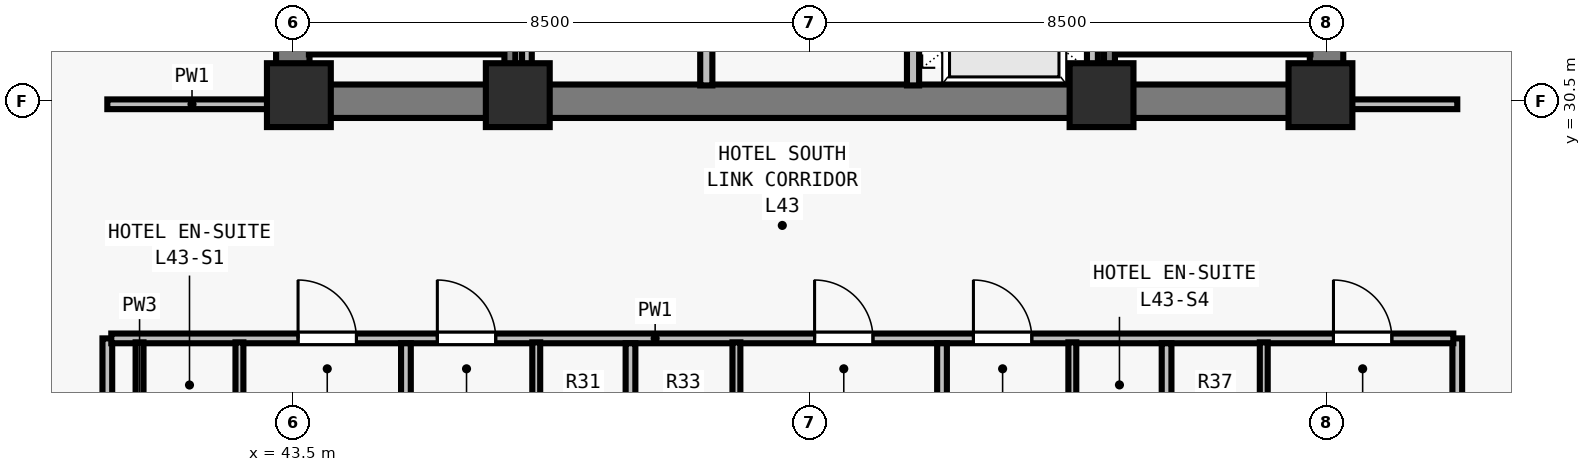
"""IFC4 building model, lengths in metres.
Left out: names, types, materials, properties, quantities, classifications, styles, units other than length and angle.
Written with IfcOpenShell. Run it as: python <this file> out.ifc"""

import sys

from ifc_helpers import new_model, si_unit, direction, frame, frame_2d, origin, origin_2d, place, context, subcontext, project, spatial, rectangle, extrude, element, fill, save


model = new_model("IFC4")
c1 = context("Model", 3, precision=1e-05, world=origin(), true_north=direction((0.0, 1.0)))
c2 = subcontext(c1, "Body", "Model", "MODEL_VIEW")
j1 = project(units=[si_unit("LENGTHUNIT", "METRE"), si_unit("PLANEANGLEUNIT", "RADIAN")], contexts=[c1])
p1 = place(None, origin())
s1 = spatial("IfcSite", under=j1, at=p1, CompositionType="ELEMENT")
p2 = place(p1, origin())
s2 = spatial("IfcBuilding", under=s1, at=p2, CompositionType="ELEMENT")
p3 = place(p2, frame((0.0, 0.0, 158.5)))
s3 = spatial("IfcBuildingStorey", under=s2, at=p3, CompositionType="ELEMENT", Elevation=158.5)
for number, where, z_axis, x_axis in (
    (1, (43.6, 30.6, 0.0), (0.0, 0.0, 1.0), (1.0, 0.0, 0.0)),
    (2, (47.2, 30.6, 0.0), (0.0, 0.0, 1.0), (1.0, 0.0, 0.0)),
    (3, (56.8, 30.6, 0.0), (0.0, 0.0, 1.0), (1.0, 0.0, 0.0)),
    (4, (60.4, 30.6, 0.0), (0.0, 0.0, 1.0), (1.0, 0.0, 0.0)),
):
    element("IfcColumn", number, at=place(p3, frame(where, z_axis=z_axis, x_axis=x_axis)), inside=s3, PredefinedType="COLUMN", context=c2, shape_type="SweptSolid", body=[
        extrude(rectangle(XDim=1.05, YDim=1.05, at=origin_2d()), origin(), (0.0, 0.0, 1.0), 3.5),
    ])
p4 = place(p3, frame((43.225, 30.5, 0.0), z_axis=(0.0, 0.0, 1.0), x_axis=(1.0, 0.0, 0.0)))
e5 = element("IfcWall", 5, at=p4, inside=s3, PredefinedType="SHEAR", context=c2, shape_type="SweptSolid", body=[
    extrude(rectangle(XDim=17.55, YDim=0.55, at=frame_2d((8.775, 0.0))), origin(), (0.0, 0.0, 1.0), 3.28),
])
for number, where, z_axis, x_axis in (
    (6, (43.5, 30.765, 0.0), (0.0, 0.0, 1.0), (0.0, 1.0, 0.0)),
    (7, (60.5, 30.765, 0.0), (0.0, 0.0, 1.0), (0.0, 1.0, 0.0)),
):
    element("IfcWall", number, at=place(p3, frame(where, z_axis=z_axis, x_axis=x_axis)), inside=s3, PredefinedType="SHEAR", context=c2, shape_type="SweptSolid", body=[
        extrude(rectangle(XDim=7.985, YDim=0.55, at=frame_2d((3.993, 0.0))), origin(), (0.0, 0.0, 1.0), 3.28),
    ])
p5 = place(p3, frame((50.3, 30.76, 0.0), z_axis=(0.0, 0.0, 1.0), x_axis=(0.0, 1.0, 0.0)))
e8 = element("IfcWall", 8, at=p5, inside=s3, PredefinedType="SOLIDWALL", context=c2, shape_type="SweptSolid", body=[
    extrude(rectangle(XDim=7.855, YDim=0.2, at=frame_2d((3.927, 0.0))), origin(), (0.0, 0.0, 1.0), 3.28),
])
p6 = place(p5, frame((3.29, 0.0, 0.0)))
e9 = element("IfcOpeningElement", 9, at=p6, cuts=e8, PredefinedType="OPENING", context=c2, shape_type="SweptSolid", body=[
    extrude(rectangle(XDim=0.9, YDim=2.12, at=frame_2d((0.45, 1.06))), frame((0.0, 0.11, 0.0), z_axis=(0.0, -1.0, 0.0), x_axis=(1.0, 0.0, 0.0)), (0.0, 0.0, 1.0), 0.22),
])
p7 = place(p3, frame((53.7, 30.76, 0.0), z_axis=(0.0, 0.0, 1.0), x_axis=(0.0, 1.0, 0.0)))
e10 = element("IfcWall", 10, at=p7, inside=s3, PredefinedType="SOLIDWALL", context=c2, shape_type="SweptSolid", body=[
    extrude(rectangle(XDim=7.855, YDim=0.2, at=frame_2d((3.927, 0.0))), origin(), (0.0, 0.0, 1.0), 3.28),
])
p8 = place(p7, frame((0.79, 0.0, 0.0)))
e11 = element("IfcOpeningElement", 11, at=p8, cuts=e10, PredefinedType="OPENING", context=c2, shape_type="SweptSolid", body=[
    extrude(rectangle(XDim=1.1, YDim=2.2, at=frame_2d((0.55, 1.1))), frame((0.0, 0.11, 0.0), z_axis=(0.0, -1.0, 0.0), x_axis=(1.0, 0.0, 0.0)), (0.0, 0.0, 1.0), 0.22),
])
p9 = place(p7, frame((3.49, 0.0, 0.0)))
e12 = element("IfcOpeningElement", 12, at=p9, cuts=e10, PredefinedType="OPENING", context=c2, shape_type="SweptSolid", body=[
    extrude(rectangle(XDim=1.1, YDim=2.2, at=frame_2d((0.55, 1.1))), frame((0.0, 0.11, 0.0), z_axis=(0.0, -1.0, 0.0), x_axis=(1.0, 0.0, 0.0)), (0.0, 0.0, 1.0), 0.22),
])
p10 = place(p7, frame((6.19, 0.0, 0.0)))
e13 = element("IfcOpeningElement", 13, at=p10, cuts=e10, PredefinedType="OPENING", context=c2, shape_type="SweptSolid", body=[
    extrude(rectangle(XDim=1.1, YDim=2.2, at=frame_2d((0.55, 1.1))), frame((0.0, 0.11, 0.0), z_axis=(0.0, -1.0, 0.0), x_axis=(1.0, 0.0, 0.0)), (0.0, 0.0, 1.0), 0.22),
])
p11 = place(p3, frame((47.35, 30.76, 0.0), z_axis=(0.0, 0.0, 1.0), x_axis=(0.0, 1.0, 0.0)))
e14 = element("IfcWall", 14, at=p11, inside=s3, PredefinedType="PARTITIONING", context=c2, shape_type="SweptSolid", body=[
    extrude(rectangle(XDim=7.855, YDim=0.16, at=frame_2d((3.927, 0.0))), origin(), (0.0, 0.0, 1.0), 3.28),
])
p12 = place(p3, frame((56.65, 30.76, 0.0), z_axis=(0.0, 0.0, 1.0), x_axis=(0.0, 1.0, 0.0)))
e15 = element("IfcWall", 15, at=p12, inside=s3, PredefinedType="SOLIDWALL", context=c2, shape_type="SweptSolid", body=[
    extrude(rectangle(XDim=7.855, YDim=0.18, at=frame_2d((3.927, 0.0))), origin(), (0.0, 0.0, 1.0), 3.28),
])
p13 = place(p3, frame((40.45, 15.325, 0.0), z_axis=(0.0, 0.0, 1.0), x_axis=(0.0, 1.0, 0.0)))
e16 = element("IfcWall", 16, at=p13, inside=s3, PredefinedType="PARTITIONING", context=c2, shape_type="SweptSolid", body=[
    extrude(rectangle(XDim=11.275, YDim=0.16, at=frame_2d((5.638, 0.0))), origin(), (0.0, 0.0, 1.0), 2.555),
])
p14 = place(p3, frame((40.45, 30.45, 0.0), z_axis=(0.0, 0.0, 1.0), x_axis=(1.0, 0.0, 0.0)))
e17 = element("IfcWall", 17, at=p14, inside=s3, PredefinedType="PARTITIONING", context=c2, shape_type="SweptSolid", body=[
    extrude(rectangle(XDim=2.785, YDim=0.16, at=frame_2d((1.393, 0.0))), origin(), (0.0, 0.0, 1.0), 3.28),
])
p15 = place(p3, frame((62.65, 15.325, 0.0), z_axis=(0.0, 0.0, 1.0), x_axis=(0.0, 1.0, 0.0)))
e18 = element("IfcWall", 18, at=p15, inside=s3, PredefinedType="PARTITIONING", context=c2, shape_type="SweptSolid", body=[
    extrude(rectangle(XDim=11.275, YDim=0.16, at=frame_2d((5.638, 0.0))), origin(), (0.0, 0.0, 1.0), 3.28),
])
p16 = place(p3, frame((60.765, 30.45, 0.0), z_axis=(0.0, 0.0, 1.0), x_axis=(1.0, 0.0, 0.0)))
e19 = element("IfcWall", 19, at=p16, inside=s3, PredefinedType="PARTITIONING", context=c2, shape_type="SweptSolid", body=[
    extrude(rectangle(XDim=1.885, YDim=0.16, at=frame_2d((0.942, 0.0))), origin(), (0.0, 0.0, 1.0), 3.28),
])
p17 = place(p3, frame((40.515, 26.6, 0.0), z_axis=(0.0, 0.0, 1.0), x_axis=(1.0, 0.0, 0.0)))
e20 = element("IfcWall", 20, at=p17, inside=s3, PredefinedType="PARTITIONING", context=c2, shape_type="SweptSolid", body=[
    extrude(rectangle(XDim=22.07, YDim=0.16, at=frame_2d((11.035, 0.0))), origin(), (0.0, 0.0, 1.0), 3.28),
])
p18 = place(p17, frame((3.072, 0.0, 0.0)))
e21 = element("IfcOpeningElement", 21, at=p18, cuts=e20, PredefinedType="OPENING", context=c2, shape_type="SweptSolid", body=[
    extrude(rectangle(XDim=0.96, YDim=2.15, at=frame_2d((0.48, 1.075))), frame((0.0, 0.09, 0.0), z_axis=(0.0, -1.0, 0.0), x_axis=(1.0, 0.0, 0.0)), (0.0, 0.0, 1.0), 0.18),
])
p19 = place(p17, frame((5.362, 0.0, 0.0)))
e22 = element("IfcOpeningElement", 22, at=p19, cuts=e20, PredefinedType="OPENING", context=c2, shape_type="SweptSolid", body=[
    extrude(rectangle(XDim=0.96, YDim=2.15, at=frame_2d((0.48, 1.075))), frame((0.0, 0.09, 0.0), z_axis=(0.0, -1.0, 0.0), x_axis=(1.0, 0.0, 0.0)), (0.0, 0.0, 1.0), 0.18),
])
p20 = place(p17, frame((11.566, 0.0, 0.0)))
e23 = element("IfcOpeningElement", 23, at=p20, cuts=e20, PredefinedType="OPENING", context=c2, shape_type="SweptSolid", body=[
    extrude(rectangle(XDim=0.96, YDim=2.15, at=frame_2d((0.48, 1.075))), frame((0.0, 0.09, 0.0), z_axis=(0.0, -1.0, 0.0), x_axis=(1.0, 0.0, 0.0)), (0.0, 0.0, 1.0), 0.18),
])
p21 = place(p17, frame((14.178, 0.0, 0.0)))
e24 = element("IfcOpeningElement", 24, at=p21, cuts=e20, PredefinedType="OPENING", context=c2, shape_type="SweptSolid", body=[
    extrude(rectangle(XDim=0.96, YDim=2.15, at=frame_2d((0.48, 1.075))), frame((0.0, 0.09, 0.0), z_axis=(0.0, -1.0, 0.0), x_axis=(1.0, 0.0, 0.0)), (0.0, 0.0, 1.0), 0.18),
])
p22 = place(p17, frame((20.099, 0.0, 0.0)))
e25 = element("IfcOpeningElement", 25, at=p22, cuts=e20, PredefinedType="OPENING", context=c2, shape_type="SweptSolid", body=[
    extrude(rectangle(XDim=0.96, YDim=2.15, at=frame_2d((0.48, 1.075))), frame((0.0, 0.09, 0.0), z_axis=(0.0, -1.0, 0.0), x_axis=(1.0, 0.0, 0.0)), (0.0, 0.0, 1.0), 0.18),
])
for number, where, z_axis, x_axis in (
    (26, (40.98, 24.22, 0.0), (0.0, 0.0, 1.0), (0.0, 1.0, 0.0)),
    (27, (42.622, 24.22, 0.0), (0.0, 0.0, 1.0), (0.0, 1.0, 0.0)),
):
    element("IfcWall", number, at=place(p3, frame(where, z_axis=z_axis, x_axis=x_axis)), inside=s3, PredefinedType="PLUMBINGWALL", context=c2, shape_type="SweptSolid", body=[
        extrude(rectangle(XDim=2.315, YDim=0.13, at=frame_2d((1.157, 0.0))), origin(), (0.0, 0.0, 1.0), 3.28),
    ])
p23 = place(p3, frame((45.361, 15.325, 0.0), z_axis=(0.0, 0.0, 1.0), x_axis=(0.0, 1.0, 0.0)))
e28 = element("IfcWall", 28, at=p23, inside=s3, PredefinedType="PARTITIONING", context=c2, shape_type="SweptSolid", body=[
    extrude(rectangle(XDim=11.195, YDim=0.16, at=frame_2d((5.598, 0.0))), origin(), (0.0, 0.0, 1.0), 3.28),
])
p24 = place(p3, frame((47.503, 24.22, 0.0), z_axis=(0.0, 0.0, 1.0), x_axis=(0.0, 1.0, 0.0)))
e29 = element("IfcWall", 29, at=p24, inside=s3, PredefinedType="PLUMBINGWALL", context=c2, shape_type="SweptSolid", body=[
    extrude(rectangle(XDim=2.315, YDim=0.13, at=frame_2d((1.157, 0.0))), origin(), (0.0, 0.0, 1.0), 3.28),
])
p25 = place(p3, frame((49.053, 17.262, 0.0), z_axis=(0.0, 0.0, 1.0), x_axis=(0.0, 1.0, 0.0)))
e30 = element("IfcWall", 30, at=p25, inside=s3, PredefinedType="PARTITIONING", context=c2, shape_type="SweptSolid", body=[
    extrude(rectangle(XDim=9.258, YDim=0.16, at=frame_2d((4.629, 0.0))), origin(), (0.0, 0.0, 1.0), 2.896),
])
p26 = place(p3, frame((50.795, 24.22, 0.0), z_axis=(0.0, 0.0, 1.0), x_axis=(0.0, 1.0, 0.0)))
e31 = element("IfcWall", 31, at=p26, inside=s3, PredefinedType="PLUMBINGWALL", context=c2, shape_type="SweptSolid", body=[
    extrude(rectangle(XDim=2.315, YDim=0.13, at=frame_2d((1.157, 0.0))), origin(), (0.0, 0.0, 1.0), 3.28),
])
p27 = place(p3, frame((54.177, 15.27, 0.0), z_axis=(0.0, 0.0, 1.0), x_axis=(0.0, 1.0, 0.0)))
e32 = element("IfcWall", 32, at=p27, inside=s3, PredefinedType="PARTITIONING", context=c2, shape_type="SweptSolid", body=[
    extrude(rectangle(XDim=11.25, YDim=0.16, at=frame_2d((5.625, 0.0))), origin(), (0.0, 0.0, 1.0), 2.896),
])
p28 = place(p3, frame((56.32, 24.22, 0.0), z_axis=(0.0, 0.0, 1.0), x_axis=(0.0, 1.0, 0.0)))
e33 = element("IfcWall", 33, at=p28, inside=s3, PredefinedType="PLUMBINGWALL", context=c2, shape_type="SweptSolid", body=[
    extrude(rectangle(XDim=2.315, YDim=0.13, at=frame_2d((1.157, 0.0))), origin(), (0.0, 0.0, 1.0), 3.28),
])
p29 = place(p3, frame((57.869, 15.325, 0.0), z_axis=(0.0, 0.0, 1.0), x_axis=(0.0, 1.0, 0.0)))
e34 = element("IfcWall", 34, at=p29, inside=s3, PredefinedType="PARTITIONING", context=c2, shape_type="SweptSolid", body=[
    extrude(rectangle(XDim=11.195, YDim=0.16, at=frame_2d((5.598, 0.0))), origin(), (0.0, 0.0, 1.0), 3.28),
])
p30 = place(p3, frame((59.468, 24.22, 0.0), z_axis=(0.0, 0.0, 1.0), x_axis=(0.0, 1.0, 0.0)))
e35 = element("IfcWall", 35, at=p30, inside=s3, PredefinedType="PLUMBINGWALL", context=c2, shape_type="SweptSolid", body=[
    extrude(rectangle(XDim=2.315, YDim=0.13, at=frame_2d((1.157, 0.0))), origin(), (0.0, 0.0, 1.0), 3.28),
])
p31 = place(p3, frame((43.765, 31.36, 0.0), z_axis=(0.0, 0.0, 1.0), x_axis=(1.0, 0.0, 0.0)))
e36 = element("IfcWall", 36, at=p31, inside=s3, PredefinedType="SOLIDWALL", context=c2, shape_type="SweptSolid", body=[
    extrude(rectangle(XDim=3.23, YDim=0.18, at=frame_2d((1.615, 0.0))), origin(), (0.0, 0.0, 1.0), 3.28),
])
p32 = place(p3, frame((47.07, 38.78, 0.0), z_axis=(0.0, 0.0, 1.0), x_axis=(0.0, -1.0, 0.0)))
e37 = element("IfcWall", 37, at=p32, inside=s3, PredefinedType="SOLIDWALL", context=c2, shape_type="SweptSolid", body=[
    extrude(rectangle(XDim=8.017, YDim=0.18, at=frame_2d((4.009, 0.0))), origin(), (0.0, 0.0, 1.0), 3.28),
])
p33 = place(p3, frame((57.005, 31.36, 0.0), z_axis=(0.0, 0.0, 1.0), x_axis=(1.0, 0.0, 0.0)))
e38 = element("IfcWall", 38, at=p33, inside=s3, PredefinedType="SOLIDWALL", context=c2, shape_type="SweptSolid", body=[
    extrude(rectangle(XDim=3.23, YDim=0.18, at=frame_2d((1.615, 0.0))), origin(), (0.0, 0.0, 1.0), 3.28),
])
p34 = place(p3, frame((56.93, 38.78, 0.0), z_axis=(0.0, 0.0, 1.0), x_axis=(0.0, -1.0, 0.0)))
e39 = element("IfcWall", 39, at=p34, inside=s3, PredefinedType="SOLIDWALL", context=c2, shape_type="SweptSolid", body=[
    extrude(rectangle(XDim=8.017, YDim=0.18, at=frame_2d((4.009, 0.0))), origin(), (0.0, 0.0, 1.0), 3.28),
])
p35 = place(p18, origin())
e40 = element("IfcDoor", 40, at=p35, inside=s3, OperationType="SINGLE_SWING_LEFT", PredefinedType="DOOR", context=c2, shape_type="SweptSolid", body=[
    extrude(rectangle(XDim=0.96, YDim=2.15, at=frame_2d((0.48, 1.075))), frame((0.0, 0.025, 0.0), z_axis=(0.0, -1.0, 0.0), x_axis=(1.0, 0.0, 0.0)), (0.0, 0.0, 1.0), 0.05),
])
fill(e21, e40)
p36 = place(p19, origin())
e41 = element("IfcDoor", 41, at=p36, inside=s3, OperationType="SINGLE_SWING_LEFT", PredefinedType="DOOR", context=c2, shape_type="SweptSolid", body=[
    extrude(rectangle(XDim=0.96, YDim=2.15, at=frame_2d((0.48, 1.075))), frame((0.0, 0.025, 0.0), z_axis=(0.0, -1.0, 0.0), x_axis=(1.0, 0.0, 0.0)), (0.0, 0.0, 1.0), 0.05),
])
fill(e22, e41)
p37 = place(p20, origin())
e42 = element("IfcDoor", 42, at=p37, inside=s3, OperationType="SINGLE_SWING_LEFT", PredefinedType="DOOR", context=c2, shape_type="SweptSolid", body=[
    extrude(rectangle(XDim=0.96, YDim=2.15, at=frame_2d((0.48, 1.075))), frame((0.0, 0.025, 0.0), z_axis=(0.0, -1.0, 0.0), x_axis=(1.0, 0.0, 0.0)), (0.0, 0.0, 1.0), 0.05),
])
fill(e23, e42)
p38 = place(p21, origin())
e43 = element("IfcDoor", 43, at=p38, inside=s3, OperationType="SINGLE_SWING_LEFT", PredefinedType="DOOR", context=c2, shape_type="SweptSolid", body=[
    extrude(rectangle(XDim=0.96, YDim=2.15, at=frame_2d((0.48, 1.075))), frame((0.0, 0.025, 0.0), z_axis=(0.0, -1.0, 0.0), x_axis=(1.0, 0.0, 0.0)), (0.0, 0.0, 1.0), 0.05),
])
fill(e24, e43)
p39 = place(p22, origin())
e44 = element("IfcDoor", 44, at=p39, inside=s3, OperationType="SINGLE_SWING_LEFT", PredefinedType="DOOR", context=c2, shape_type="SweptSolid", body=[
    extrude(rectangle(XDim=0.96, YDim=2.15, at=frame_2d((0.48, 1.075))), frame((0.0, 0.025, 0.0), z_axis=(0.0, -1.0, 0.0), x_axis=(1.0, 0.0, 0.0)), (0.0, 0.0, 1.0), 0.05),
])
fill(e25, e44)
save(model, sys.argv[1])
